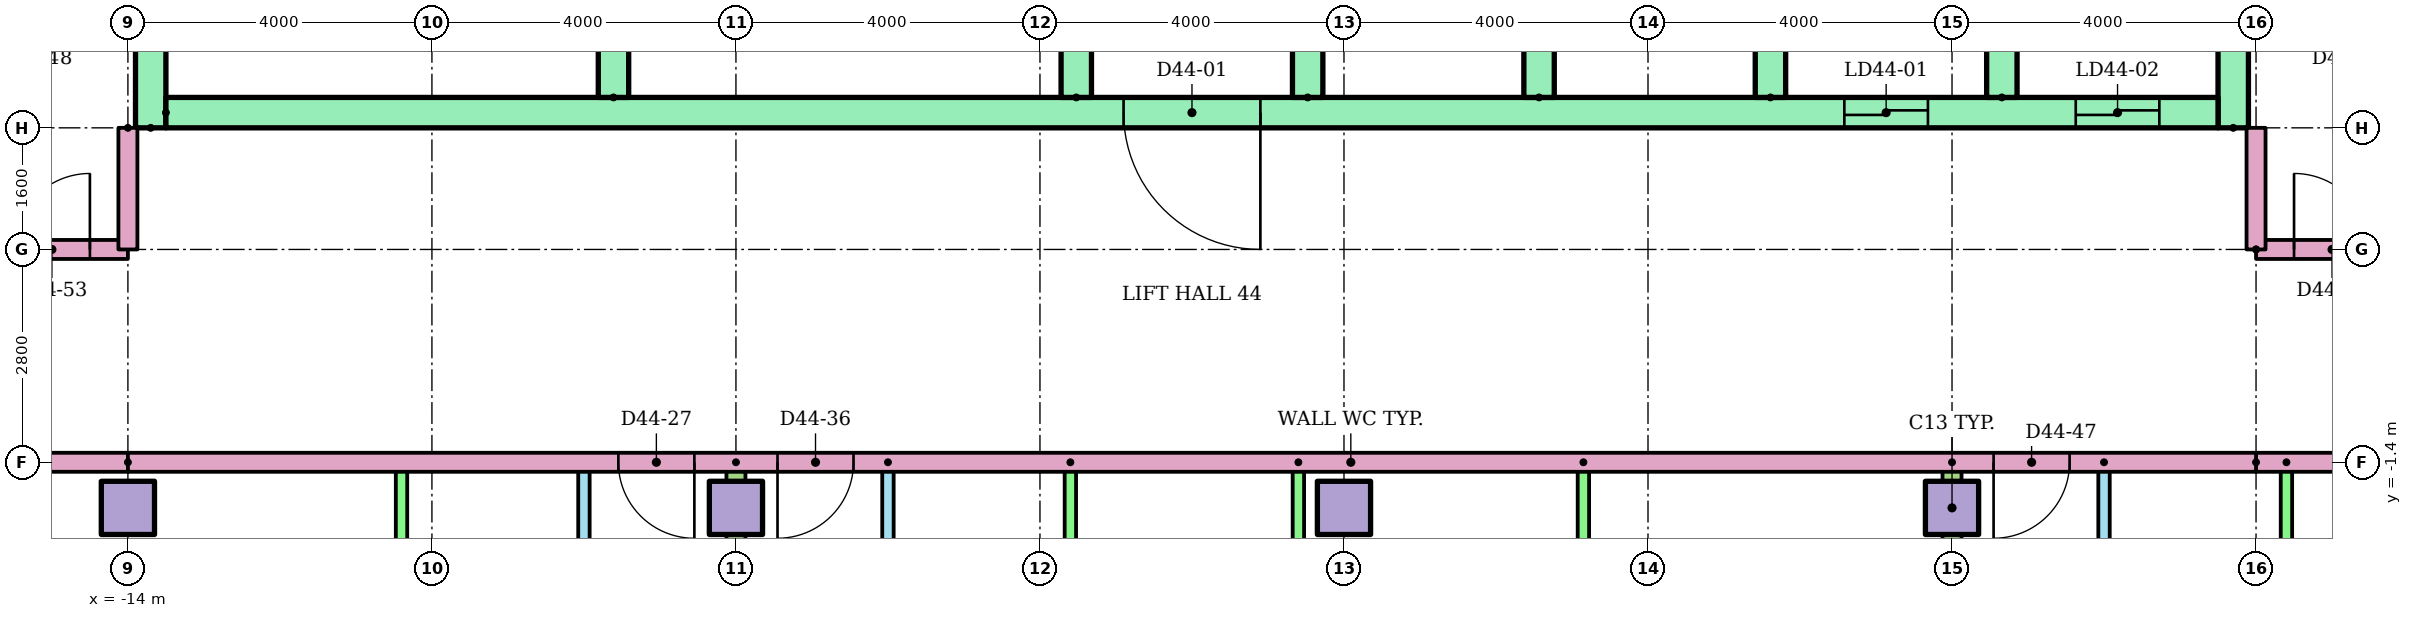
"""IFC4 building model, lengths in metres.
Left out: names, types, materials, properties, quantities, classifications, styles, units other than length and angle.
Written with IfcOpenShell. Run it as: python <this file> out.ifc"""

import sys

from ifc_helpers import new_model, si_unit, direction, frame, frame_2d, origin, origin_2d, place, context, subcontext, project, spatial, rectangle, extrude, element, fill, save


model = new_model("IFC4")
c1 = context("Model", 3, precision=1e-05, world=origin(), true_north=direction((0.0, 1.0)))
c2 = subcontext(c1, "Body", "Model", "MODEL_VIEW")
j1 = project(units=[si_unit("LENGTHUNIT", "METRE"), si_unit("PLANEANGLEUNIT", "RADIAN")], contexts=[c1])
p1 = place(None, origin())
s1 = spatial("IfcSite", under=j1, at=p1, CompositionType="ELEMENT")
p2 = place(p1, origin())
s2 = spatial("IfcBuilding", under=s1, at=p2, CompositionType="ELEMENT")
p3 = place(p2, frame((0.0, 0.0, 171.7)))
s3 = spatial("IfcBuildingStorey", under=s2, at=p3, CompositionType="ELEMENT", Elevation=171.7)
for number, where in (
    (1, (-14.0, -2.0, 0.0)),
    (2, (-6.0, -2.0, 0.0)),
    (3, (2.0, -2.0, 0.0)),
    (4, (10.0, -2.0, 0.0)),
):
    element("IfcColumn", number, at=place(p3, frame(where)), inside=s3, PredefinedType="COLUMN", context=c2, shape_type="SweptSolid", body=[
        extrude(rectangle(XDim=0.7, YDim=0.7, at=origin_2d()), origin(), (0.0, 0.0, 1.0), 3.2),
    ])
for number, where, z_axis, x_axis in (
    (5, (-13.7, 3.0, 0.0), (0.0, 0.0, 1.0), (0.0, 1.0, 0.0)),
    (6, (13.7, 3.0, 0.0), (0.0, 0.0, 1.0), (0.0, 1.0, 0.0)),
):
    element("IfcWall", number, at=place(p3, frame(where, z_axis=z_axis, x_axis=x_axis)), inside=s3, PredefinedType="SHEAR", context=c2, shape_type="SweptSolid", body=[
        extrude(rectangle(XDim=17.0, YDim=0.4, at=frame_2d((8.5, 0.0))), origin(), (0.0, 0.0, 1.0), 2.92),
    ])
p4 = place(p3, frame((-13.5, 3.2, 0.0)))
e7 = element("IfcWall", 7, at=p4, inside=s3, PredefinedType="SHEAR", context=c2, shape_type="SweptSolid", body=[
    extrude(rectangle(XDim=27.0, YDim=0.4, at=frame_2d((13.5, 0.0))), origin(), (0.0, 0.0, 1.0), 2.92),
])
p5 = place(p4, frame((22.083, 0.0, 0.0)))
e8 = element("IfcOpeningElement", 8, at=p5, cuts=e7, PredefinedType="OPENING", context=c2, shape_type="SweptSolid", body=[
    extrude(rectangle(XDim=1.1, YDim=2.1, at=frame_2d((0.55, 1.05))), frame((0.0, 0.21, 0.0), z_axis=(0.0, -1.0, 0.0), x_axis=(1.0, 0.0, 0.0)), (0.0, 0.0, 1.0), 0.42),
])
p6 = place(p4, frame((25.128, 0.0, 0.0)))
e9 = element("IfcOpeningElement", 9, at=p6, cuts=e7, PredefinedType="OPENING", context=c2, shape_type="SweptSolid", body=[
    extrude(rectangle(XDim=1.1, YDim=2.1, at=frame_2d((0.55, 1.05))), frame((0.0, 0.21, 0.0), z_axis=(0.0, -1.0, 0.0), x_axis=(1.0, 0.0, 0.0)), (0.0, 0.0, 1.0), 0.42),
])
p7 = place(p4, frame((12.6, 0.0, 0.0)))
e10 = element("IfcOpeningElement", 10, at=p7, cuts=e7, PredefinedType="OPENING", context=c2, shape_type="SweptSolid", body=[
    extrude(rectangle(XDim=1.8, YDim=2.1, at=frame_2d((0.9, 1.05))), frame((0.0, 0.21, 0.0), z_axis=(0.0, -1.0, 0.0), x_axis=(1.0, 0.0, 0.0)), (0.0, 0.0, 1.0), 0.42),
])
for number, where, z_axis, x_axis in (
    (11, (-7.611, 3.4, 0.0), (0.0, 0.0, 1.0), (0.0, 1.0, 0.0)),
    (12, (-1.522, 3.4, 0.0), (0.0, 0.0, 1.0), (0.0, 1.0, 0.0)),
    (13, (1.522, 3.4, 0.0), (0.0, 0.0, 1.0), (0.0, 1.0, 0.0)),
    (14, (4.567, 3.4, 0.0), (0.0, 0.0, 1.0), (0.0, 1.0, 0.0)),
    (15, (7.611, 3.4, 0.0), (0.0, 0.0, 1.0), (0.0, 1.0, 0.0)),
    (16, (10.656, 3.4, 0.0), (0.0, 0.0, 1.0), (0.0, 1.0, 0.0)),
):
    element("IfcWall", number, at=place(p3, frame(where, z_axis=z_axis, x_axis=x_axis)), inside=s3, PredefinedType="SHEAR", context=c2, shape_type="SweptSolid", body=[
        extrude(rectangle(XDim=3.0, YDim=0.4, at=frame_2d((1.5, 0.0))), origin(), (0.0, 0.0, 1.0), 2.92),
    ])
p8 = place(p3, frame((-8.0, -8.1, 0.0), z_axis=(0.0, 0.0, 1.0), x_axis=(0.0, 1.0, 0.0)))
e17 = element("IfcWall", 17, at=p8, inside=s3, PredefinedType="PARTITIONING", context=c2, shape_type="SweptSolid", body=[
    extrude(rectangle(XDim=6.7, YDim=0.15, at=frame_2d((3.35, 0.0))), origin(), (0.0, 0.0, 1.0), 2.4),
])
p9 = place(p8, frame((4.375, 0.0, 0.0)))
e18 = element("IfcOpeningElement", 18, at=p9, cuts=e17, PredefinedType="OPENING", context=c2, shape_type="SweptSolid", body=[
    extrude(rectangle(XDim=0.9, YDim=2.1, at=frame_2d((0.45, 1.05))), frame((0.0, 0.085, 0.0), z_axis=(0.0, -1.0, 0.0), x_axis=(1.0, 0.0, 0.0)), (0.0, 0.0, 1.0), 0.17),
])
p10 = place(p8, frame((1.075, 0.0, 0.0)))
e19 = element("IfcOpeningElement", 19, at=p10, cuts=e17, PredefinedType="OPENING", context=c2, shape_type="SweptSolid", body=[
    extrude(rectangle(XDim=0.8, YDim=2.1, at=frame_2d((0.4, 1.05))), frame((0.0, 0.085, 0.0), z_axis=(0.0, -1.0, 0.0), x_axis=(1.0, 0.0, 0.0)), (0.0, 0.0, 1.0), 0.17),
])
p11 = place(p3, frame((-10.4, -8.1, 0.0), z_axis=(0.0, 0.0, 1.0), x_axis=(0.0, 1.0, 0.0)))
e20 = element("IfcWall", 20, at=p11, inside=s3, PredefinedType="PARTITIONING", context=c2, shape_type="SweptSolid", body=[
    extrude(rectangle(XDim=6.7, YDim=0.15, at=frame_2d((3.35, 0.0))), origin(), (0.0, 0.0, 1.0), 2.4),
])
p12 = place(p3, frame((-4.0, -1.4, 0.0), z_axis=(0.0, 0.0, 1.0), x_axis=(0.0, -1.0, 0.0)))
e21 = element("IfcWall", 21, at=p12, inside=s3, PredefinedType="PARTITIONING", context=c2, shape_type="SweptSolid", body=[
    extrude(rectangle(XDim=6.7, YDim=0.15, at=frame_2d((3.35, 0.0))), origin(), (0.0, 0.0, 1.0), 2.4),
])
p13 = place(p12, frame((1.425, 0.0, 0.0)))
e22 = element("IfcOpeningElement", 22, at=p13, cuts=e21, PredefinedType="OPENING", context=c2, shape_type="SweptSolid", body=[
    extrude(rectangle(XDim=0.9, YDim=2.1, at=frame_2d((0.45, 1.05))), frame((0.0, 0.085, 0.0), z_axis=(0.0, -1.0, 0.0), x_axis=(1.0, 0.0, 0.0)), (0.0, 0.0, 1.0), 0.17),
])
p14 = place(p12, frame((4.825, 0.0, 0.0)))
e23 = element("IfcOpeningElement", 23, at=p14, cuts=e21, PredefinedType="OPENING", context=c2, shape_type="SweptSolid", body=[
    extrude(rectangle(XDim=0.8, YDim=2.1, at=frame_2d((0.4, 1.05))), frame((0.0, 0.085, 0.0), z_axis=(0.0, -1.0, 0.0), x_axis=(1.0, 0.0, 0.0)), (0.0, 0.0, 1.0), 0.17),
])
for number, where, z_axis, x_axis in (
    (24, (-1.6, -1.4, 0.0), (0.0, 0.0, 1.0), (0.0, -1.0, 0.0)),
    (25, (1.4, -1.4, 0.0), (0.0, 0.0, 1.0), (0.0, -1.0, 0.0)),
    (26, (5.15, -1.4, 0.0), (0.0, 0.0, 1.0), (0.0, -1.0, 0.0)),
):
    element("IfcWall", number, at=place(p3, frame(where, z_axis=z_axis, x_axis=x_axis)), inside=s3, PredefinedType="PARTITIONING", context=c2, shape_type="SweptSolid", body=[
        extrude(rectangle(XDim=6.7, YDim=0.15, at=frame_2d((3.35, 0.0))), origin(), (0.0, 0.0, 1.0), 2.4),
    ])
p15 = place(p3, frame((-6.0, -1.4, 0.0), z_axis=(0.0, 0.0, 1.0), x_axis=(0.0, -1.0, 0.0)))
e27 = element("IfcWall", 27, at=p15, inside=s3, PredefinedType="PARTITIONING", context=c2, shape_type="SweptSolid", body=[
    extrude(rectangle(XDim=15.01, YDim=0.25, at=frame_2d((7.505, 0.0))), origin(), (0.0, 0.0, 1.0), 2.4),
])
p16 = place(p3, frame((12.0, -1.4, 0.0), z_axis=(0.0, 0.0, 1.0), x_axis=(0.0, -1.0, 0.0)))
e28 = element("IfcWall", 28, at=p16, inside=s3, PredefinedType="PARTITIONING", context=c2, shape_type="SweptSolid", body=[
    extrude(rectangle(XDim=6.7, YDim=0.15, at=frame_2d((3.35, 0.0))), origin(), (0.0, 0.0, 1.0), 2.4),
])
p17 = place(p16, frame((1.425, 0.0, 0.0)))
e29 = element("IfcOpeningElement", 29, at=p17, cuts=e28, PredefinedType="OPENING", context=c2, shape_type="SweptSolid", body=[
    extrude(rectangle(XDim=0.9, YDim=2.1, at=frame_2d((0.45, 1.05))), frame((0.0, 0.085, 0.0), z_axis=(0.0, -1.0, 0.0), x_axis=(1.0, 0.0, 0.0)), (0.0, 0.0, 1.0), 0.17),
])
p18 = place(p16, frame((4.825, 0.0, 0.0)))
e30 = element("IfcOpeningElement", 30, at=p18, cuts=e28, PredefinedType="OPENING", context=c2, shape_type="SweptSolid", body=[
    extrude(rectangle(XDim=0.8, YDim=2.1, at=frame_2d((0.4, 1.05))), frame((0.0, 0.085, 0.0), z_axis=(0.0, -1.0, 0.0), x_axis=(1.0, 0.0, 0.0)), (0.0, 0.0, 1.0), 0.17),
])
p19 = place(p3, frame((14.4, -1.4, 0.0), z_axis=(0.0, 0.0, 1.0), x_axis=(0.0, -1.0, 0.0)))
e31 = element("IfcWall", 31, at=p19, inside=s3, PredefinedType="PARTITIONING", context=c2, shape_type="SweptSolid", body=[
    extrude(rectangle(XDim=6.7, YDim=0.15, at=frame_2d((3.35, 0.0))), origin(), (0.0, 0.0, 1.0), 2.4),
])
p20 = place(p3, frame((10.0, -1.4, 0.0), z_axis=(0.0, 0.0, 1.0), x_axis=(0.0, -1.0, 0.0)))
e32 = element("IfcWall", 32, at=p20, inside=s3, PredefinedType="PARTITIONING", context=c2, shape_type="SweptSolid", body=[
    extrude(rectangle(XDim=15.01, YDim=0.25, at=frame_2d((7.505, 0.0))), origin(), (0.0, 0.0, 1.0), 2.4),
])
p21 = place(p3, frame((-14.0, -1.4, 0.0), z_axis=(0.0, 0.0, 1.0), x_axis=(-1.0, 0.0, 0.0)))
e33 = element("IfcWall", 33, at=p21, inside=s3, PredefinedType="PARTITIONING", context=c2, shape_type="SweptSolid", body=[
    extrude(rectangle(XDim=10.82, YDim=0.25, at=frame_2d((5.41, 0.0))), origin(), (0.0, 0.0, 1.0), 2.4),
])
p22 = place(p3, frame((29.0, -1.4, 0.0), z_axis=(0.0, 0.0, 1.0), x_axis=(-1.0, 0.0, 0.0)))
e34 = element("IfcWall", 34, at=p22, inside=s3, PredefinedType="PARTITIONING", context=c2, shape_type="SweptSolid", body=[
    extrude(rectangle(XDim=15.0, YDim=0.25, at=frame_2d((7.5, 0.0))), origin(), (0.0, 0.0, 1.0), 2.4),
])
p23 = place(p3, frame((-24.82, 1.4, 0.0)))
e35 = element("IfcWall", 35, at=p23, inside=s3, PredefinedType="PARTITIONING", context=c2, shape_type="SweptSolid", body=[
    extrude(rectangle(XDim=10.82, YDim=0.25, at=frame_2d((5.41, 0.0))), origin(), (0.0, 0.0, 1.0), 2.4),
])
p24 = place(p23, frame((9.32, 0.0, 0.0)))
e36 = element("IfcOpeningElement", 36, at=p24, cuts=e35, PredefinedType="OPENING", context=c2, shape_type="SweptSolid", body=[
    extrude(rectangle(XDim=1.0, YDim=2.1, at=frame_2d((0.5, 1.05))), frame((0.0, 0.135, 0.0), z_axis=(0.0, -1.0, 0.0), x_axis=(1.0, 0.0, 0.0)), (0.0, 0.0, 1.0), 0.27),
])
p25 = place(p3, frame((14.0, 1.4, 0.0)))
e37 = element("IfcWall", 37, at=p25, inside=s3, PredefinedType="PARTITIONING", context=c2, shape_type="SweptSolid", body=[
    extrude(rectangle(XDim=15.0, YDim=0.25, at=frame_2d((7.5, 0.0))), origin(), (0.0, 0.0, 1.0), 2.4),
])
p26 = place(p25, frame((0.5, 0.0, 0.0)))
e38 = element("IfcOpeningElement", 38, at=p26, cuts=e37, PredefinedType="OPENING", context=c2, shape_type="SweptSolid", body=[
    extrude(rectangle(XDim=1.0, YDim=2.1, at=frame_2d((0.5, 1.05))), frame((0.0, 0.135, 0.0), z_axis=(0.0, -1.0, 0.0), x_axis=(1.0, 0.0, 0.0)), (0.0, 0.0, 1.0), 0.27),
])
p27 = place(p25, frame((12.547, 0.0, 0.0)))
e39 = element("IfcOpeningElement", 39, at=p27, cuts=e37, PredefinedType="OPENING", context=c2, shape_type="SweptSolid", body=[
    extrude(rectangle(XDim=1.0, YDim=2.1, at=frame_2d((0.5, 1.05))), frame((0.0, 0.135, 0.0), z_axis=(0.0, -1.0, 0.0), x_axis=(1.0, 0.0, 0.0)), (0.0, 0.0, 1.0), 0.27),
])
p28 = place(p3, frame((14.0, -1.4, 0.0), z_axis=(0.0, 0.0, 1.0), x_axis=(-1.0, 0.0, 0.0)))
e40 = element("IfcWall", 40, at=p28, inside=s3, PredefinedType="PARTITIONING", context=c2, shape_type="SweptSolid", body=[
    extrude(rectangle(XDim=28.0, YDim=0.25, at=frame_2d((14.0, 0.0))), origin(), (0.0, 0.0, 1.0), 2.4),
])
p29 = place(p28, frame((20.547, 0.0, 0.0)))
e41 = element("IfcOpeningElement", 41, at=p29, cuts=e40, PredefinedType="OPENING", context=c2, shape_type="SweptSolid", body=[
    extrude(rectangle(XDim=1.0, YDim=2.1, at=frame_2d((0.5, 1.05))), frame((0.0, 0.135, 0.0), z_axis=(0.0, -1.0, 0.0), x_axis=(1.0, 0.0, 0.0)), (0.0, 0.0, 1.0), 0.27),
])
p30 = place(p28, frame((18.453, 0.0, 0.0)))
e42 = element("IfcOpeningElement", 42, at=p30, cuts=e40, PredefinedType="OPENING", context=c2, shape_type="SweptSolid", body=[
    extrude(rectangle(XDim=1.0, YDim=2.1, at=frame_2d((0.5, 1.05))), frame((0.0, 0.135, 0.0), z_axis=(0.0, -1.0, 0.0), x_axis=(1.0, 0.0, 0.0)), (0.0, 0.0, 1.0), 0.27),
])
p31 = place(p28, frame((2.453, 0.0, 0.0)))
e43 = element("IfcOpeningElement", 43, at=p31, cuts=e40, PredefinedType="OPENING", context=c2, shape_type="SweptSolid", body=[
    extrude(rectangle(XDim=1.0, YDim=2.1, at=frame_2d((0.5, 1.05))), frame((0.0, 0.135, 0.0), z_axis=(0.0, -1.0, 0.0), x_axis=(1.0, 0.0, 0.0)), (0.0, 0.0, 1.0), 0.27),
])
for number, where, z_axis, x_axis in (
    (44, (-14.0, 3.0, 0.0), (0.0, 0.0, 1.0), (0.0, -1.0, 0.0)),
    (45, (14.0, 1.4, 0.0), (0.0, 0.0, 1.0), (0.0, 1.0, 0.0)),
):
    element("IfcWall", number, at=place(p3, frame(where, z_axis=z_axis, x_axis=x_axis)), inside=s3, PredefinedType="PARTITIONING", context=c2, shape_type="SweptSolid", body=[
        extrude(rectangle(XDim=1.6, YDim=0.25, at=frame_2d((0.8, 0.0))), origin(), (0.0, 0.0, 1.0), 2.4),
    ])
p32 = place(p5, origin())
e46 = element("IfcDoor", 46, at=p32, inside=s3, OperationType="SLIDING_TO_LEFT", PredefinedType="DOOR", context=c2, shape_type="SweptSolid", body=[
    extrude(rectangle(XDim=1.1, YDim=2.1, at=frame_2d((0.55, 1.05))), frame((0.0, 0.025, 0.0), z_axis=(0.0, -1.0, 0.0), x_axis=(1.0, 0.0, 0.0)), (0.0, 0.0, 1.0), 0.05),
])
fill(e8, e46)
p33 = place(p6, origin())
e47 = element("IfcDoor", 47, at=p33, inside=s3, OperationType="SLIDING_TO_LEFT", PredefinedType="DOOR", context=c2, shape_type="SweptSolid", body=[
    extrude(rectangle(XDim=1.1, YDim=2.1, at=frame_2d((0.55, 1.05))), frame((0.0, 0.025, 0.0), z_axis=(0.0, -1.0, 0.0), x_axis=(1.0, 0.0, 0.0)), (0.0, 0.0, 1.0), 0.05),
])
fill(e9, e47)
p34 = place(p7, frame((1.8, 0.0, 0.0), z_axis=(0.0, 0.0, 1.0), x_axis=(-1.0, 0.0, 0.0)))
e48 = element("IfcDoor", 48, at=p34, inside=s3, OperationType="DOUBLE_DOOR_SINGLE_SWING", PredefinedType="DOOR", context=c2, shape_type="SweptSolid", body=[
    extrude(rectangle(XDim=1.8, YDim=2.1, at=frame_2d((0.9, 1.05))), frame((0.0, 0.025, 0.0), z_axis=(0.0, -1.0, 0.0), x_axis=(1.0, 0.0, 0.0)), (0.0, 0.0, 1.0), 0.05),
])
fill(e10, e48)
p35 = place(p29, origin())
e49 = element("IfcDoor", 49, at=p35, inside=s3, OperationType="SINGLE_SWING_LEFT", PredefinedType="DOOR", context=c2, shape_type="SweptSolid", body=[
    extrude(rectangle(XDim=1.0, YDim=2.1, at=frame_2d((0.5, 1.05))), frame((0.0, 0.025, 0.0), z_axis=(0.0, -1.0, 0.0), x_axis=(1.0, 0.0, 0.0)), (0.0, 0.0, 1.0), 0.05),
])
fill(e41, e49)
p36 = place(p30, origin())
e50 = element("IfcDoor", 50, at=p36, inside=s3, OperationType="SINGLE_SWING_RIGHT", PredefinedType="DOOR", context=c2, shape_type="SweptSolid", body=[
    extrude(rectangle(XDim=1.0, YDim=2.1, at=frame_2d((0.5, 1.05))), frame((0.0, 0.025, 0.0), z_axis=(0.0, -1.0, 0.0), x_axis=(1.0, 0.0, 0.0)), (0.0, 0.0, 1.0), 0.05),
])
fill(e42, e50)
p37 = place(p31, origin())
e51 = element("IfcDoor", 51, at=p37, inside=s3, OperationType="SINGLE_SWING_RIGHT", PredefinedType="DOOR", context=c2, shape_type="SweptSolid", body=[
    extrude(rectangle(XDim=1.0, YDim=2.1, at=frame_2d((0.5, 1.05))), frame((0.0, 0.025, 0.0), z_axis=(0.0, -1.0, 0.0), x_axis=(1.0, 0.0, 0.0)), (0.0, 0.0, 1.0), 0.05),
])
fill(e43, e51)
p38 = place(p24, origin())
e52 = element("IfcDoor", 52, at=p38, inside=s3, OperationType="SINGLE_SWING_RIGHT", PredefinedType="DOOR", context=c2, shape_type="SweptSolid", body=[
    extrude(rectangle(XDim=1.0, YDim=2.1, at=frame_2d((0.5, 1.05))), frame((0.0, 0.025, 0.0), z_axis=(0.0, -1.0, 0.0), x_axis=(1.0, 0.0, 0.0)), (0.0, 0.0, 1.0), 0.05),
])
fill(e36, e52)
p39 = place(p26, origin())
e53 = element("IfcDoor", 53, at=p39, inside=s3, OperationType="SINGLE_SWING_LEFT", PredefinedType="DOOR", context=c2, shape_type="SweptSolid", body=[
    extrude(rectangle(XDim=1.0, YDim=2.1, at=frame_2d((0.5, 1.05))), frame((0.0, 0.025, 0.0), z_axis=(0.0, -1.0, 0.0), x_axis=(1.0, 0.0, 0.0)), (0.0, 0.0, 1.0), 0.05),
])
fill(e38, e53)
save(model, sys.argv[1])
